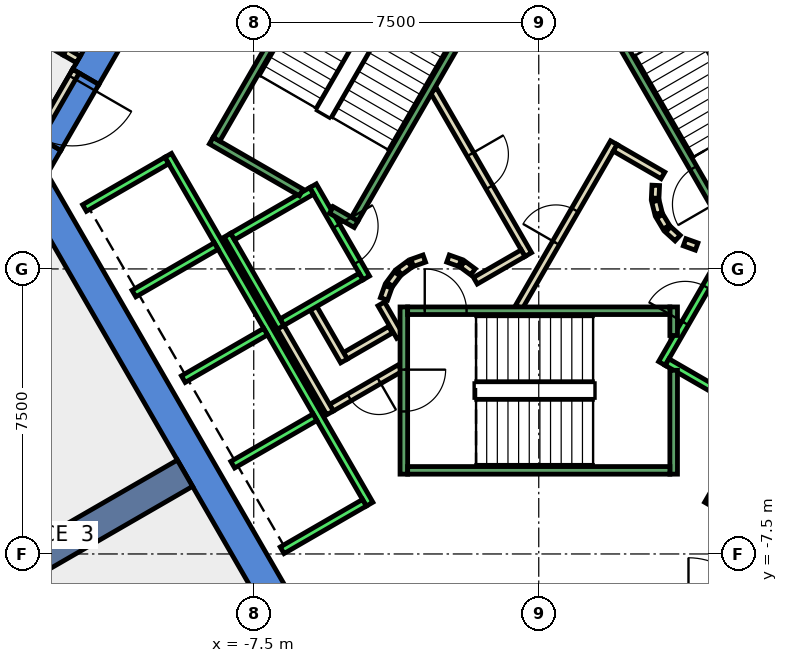
"""IFC4 building model, lengths in metres.
Left out: names, types, materials, properties, quantities, classifications, styles, units other than length and angle.
Written with IfcOpenShell. Run it as: python <this file> out.ifc"""

import sys

from ifc_helpers import new_model, si_unit, direction, frame, frame_2d, origin, place, context, subcontext, project, spatial, polyline, rectangle, outline, extrude, element, fill, save


model = new_model("IFC4")
c1 = context("Model", 3, precision=1e-05, world=origin(), true_north=direction((0.0, 1.0)))
c2 = subcontext(c1, "Body", "Model", "MODEL_VIEW")
j1 = project(units=[si_unit("LENGTHUNIT", "METRE"), si_unit("PLANEANGLEUNIT", "RADIAN")], contexts=[c1])
p1 = place(None, origin())
s1 = spatial("IfcSite", under=j1, at=p1, CompositionType="ELEMENT")
p2 = place(p1, origin())
s2 = spatial("IfcBuilding", under=s1, at=p2, CompositionType="ELEMENT")
p3 = place(p2, frame((0.0, 0.0, 150.8)))
s3 = spatial("IfcBuildingStorey", under=s2, at=p3, CompositionType="ELEMENT", Elevation=150.8)
p4 = place(p3, frame((0.0, 0.0, -0.4)))
e1 = element("IfcWall", 1, at=p4, inside=s3, PredefinedType="SHEAR", context=c2, shape_type="SweptSolid", body=[
    extrude(outline(polyline([(-12.267, 5.252), (-11.575, 4.852), (-6.466, 13.7), (-6.928, 14.5), (-12.267, 5.252)])), origin(), (0.0, 0.0, 1.0), 4.2),
])
p5 = place(p3, frame((0.0, 0.0, -0.4)))
e2 = element("IfcWall", 2, at=p5, inside=s3, PredefinedType="SHEAR", context=c2, shape_type="SweptSolid", body=[
    extrude(outline(polyline([(-12.575, 3.12), (-13.267, 3.52), (-13.856, 2.5), (-12.933, 2.5), (-12.575, 3.12)])), origin(), (0.0, 0.0, 1.0), 4.2),
])
p6 = place(p3, frame((0.0, 0.0, 3.6)))
e3 = element("IfcWall", 3, at=p6, inside=s3, PredefinedType="SHEAR", context=c2, shape_type="SweptSolid", body=[
    extrude(outline(polyline([(-13.267, 3.52), (-12.575, 3.12), (-11.575, 4.852), (-12.267, 5.252), (-13.267, 3.52)])), origin(), (0.0, 0.0, 1.0), 0.2),
])
p7 = place(p3, frame((0.0, 0.0, -0.4)))
e4 = element("IfcWall", 4, at=p7, inside=s3, PredefinedType="SHEAR", context=c2, shape_type="SweptSolid", body=[
    extrude(outline(polyline([(-13.856, 2.5), (-6.928, -9.5), (-6.466, -8.7), (-12.933, 2.5), (-13.856, 2.5)])), origin(), (0.0, 0.0, 1.0), 4.2),
])
p8 = place(p3, frame((-9.31, -5.375, -0.4), z_axis=(0.0, 0.0, 1.0), x_axis=(-0.866017533419, -0.500013631625, 0.0)))
e5 = element("IfcWall", 5, at=p8, inside=s3, PredefinedType="SHEAR", context=c2, shape_type="SweptSolid", body=[
    extrude(rectangle(XDim=9.0, YDim=0.8, at=frame_2d((4.5, 0.0))), origin(), (0.0, 0.0, 1.0), 4.2),
])
p9 = place(p3, frame((-14.359, 6.806, 0.0), z_axis=(0.0, 0.0, 1.0), x_axis=(0.866155875717, -0.499773947861, 0.0)))
e6 = element("IfcWall", 6, at=p9, inside=s3, PredefinedType="PARTITIONING", context=c2, shape_type="SweptSolid", body=[
    extrude(rectangle(XDim=2.189, YDim=0.2, at=frame_2d((1.094, 0.0))), origin(), (0.0, 0.0, 1.0), 3.8),
])
p10 = place(p3, frame((-3.9, -1.599, 0.0), z_axis=(0.0, 0.0, 1.0), x_axis=(-0.865969445389, -0.500096910261, 0.0)))
e7 = element("IfcWall", 7, at=p10, inside=s3, PredefinedType="PARTITIONING", context=c2, shape_type="SweptSolid", body=[
    extrude(rectangle(XDim=1.373, YDim=0.2, at=frame_2d((0.687, 0.0))), origin(), (0.0, 0.0, 1.0), 3.8),
])
p11 = place(p3, frame((-5.126, -2.422, 0.0), z_axis=(0.0, 0.0, 1.0), x_axis=(-0.500062241894, 0.865989465428, 0.0)))
e8 = element("IfcWall", 8, at=p11, inside=s3, PredefinedType="PARTITIONING", context=c2, shape_type="SweptSolid", body=[
    extrude(rectangle(XDim=1.7, YDim=0.2, at=frame_2d((0.85, 0.0))), origin(), (0.0, 0.0, 1.0), 3.8),
])
p12 = place(p3, frame((-3.65, -2.61, 0.0), z_axis=(0.0, 0.0, 1.0), x_axis=(-0.866072462134, -0.499918483688, 0.0)))
e9 = element("IfcWall", 9, at=p12, inside=s3, PredefinedType="PARTITIONING", context=c2, shape_type="SweptSolid", body=[
    extrude(rectangle(XDim=2.084, YDim=0.2, at=frame_2d((1.042, 0.0))), origin(), (0.0, 0.0, 1.0), 3.8),
])
p13 = place(p12, frame((0.642, 0.0, 0.0)))
e10 = element("IfcOpeningElement", 10, at=p13, cuts=e9, PredefinedType="OPENING", context=c2, shape_type="SweptSolid", body=[
    extrude(rectangle(XDim=0.9, YDim=2.1, at=frame_2d((0.45, 1.05))), frame((0.0, 0.11, 0.0), z_axis=(0.0, -1.0, 0.0), x_axis=(1.0, 0.0, 0.0)), (0.0, 0.0, 1.0), 0.22),
])
p14 = place(p3, frame((-5.492, -3.788, 0.0), z_axis=(0.0, 0.0, 1.0), x_axis=(-0.500008949224, 0.866020236886, 0.0)))
e11 = element("IfcWall", 11, at=p14, inside=s3, PredefinedType="PARTITIONING", context=c2, shape_type="SweptSolid", body=[
    extrude(rectangle(XDim=2.68, YDim=0.2, at=frame_2d((1.34, 0.0))), origin(), (0.0, 0.0, 1.0), 3.8),
])
p15 = place(p3, frame((-4.145, -0.92, 0.0), z_axis=(0.0, 0.0, 1.0), x_axis=(0.499743786207, -0.866173278362, 0.0)))
e12 = element("IfcWall", 12, at=p15, inside=s3, PredefinedType="PARTITIONING", context=c2, shape_type="SweptSolid", body=[
    extrude(rectangle(XDim=0.991, YDim=0.2, at=frame_2d((0.495, 0.0))), origin(), (0.0, 0.0, 1.0), 3.8),
])
p16 = place(p3, frame((-0.52, -1.0, 0.0), z_axis=(0.0, 0.0, 1.0), x_axis=(0.50011622646, 0.865958290007, 0.0)))
e13 = element("IfcWall", 13, at=p16, inside=s3, PredefinedType="PARTITIONING", context=c2, shape_type="SweptSolid", body=[
    extrude(rectangle(XDim=4.991, YDim=0.2, at=frame_2d((2.496, 0.0))), origin(), (0.0, 0.0, 1.0), 3.8),
])
p17 = place(p16, frame((1.945, 0.0, 0.0)))
e14 = element("IfcOpeningElement", 14, at=p17, cuts=e13, PredefinedType="OPENING", context=c2, shape_type="SweptSolid", body=[
    extrude(rectangle(XDim=1.0, YDim=2.1, at=frame_2d((0.5, 1.05))), frame((0.0, 0.11, 0.0), z_axis=(0.0, -1.0, 0.0), x_axis=(1.0, 0.0, 0.0)), (0.0, 0.0, 1.0), 0.22),
])
p18 = place(p3, frame((2.012, 3.186, 0.0), z_axis=(0.0, 0.0, 1.0), x_axis=(0.865891012941, -0.500232699559, 0.0)))
e15 = element("IfcWall", 15, at=p18, inside=s3, PredefinedType="PARTITIONING", context=c2, shape_type="SweptSolid", body=[
    extrude(rectangle(XDim=1.449, YDim=0.2, at=frame_2d((0.725, 0.0))), origin(), (0.0, 0.0, 1.0), 3.8),
])
p19 = place(p3, frame((3.079, 2.199, 0.0), z_axis=(0.0, 0.0, 1.0), x_axis=(-0.047771483479, -0.998858290933, 0.0)))
e16 = element("IfcWall", 16, at=p19, inside=s3, PredefinedType="PARTITIONING", context=c2, shape_type="SweptSolid", body=[
    extrude(rectangle(XDim=0.337, YDim=0.2, at=frame_2d((0.169, 0.0))), origin(), (0.0, 0.0, 1.0), 3.8),
])
p20 = place(p3, frame((3.07, 1.786, 0.0), z_axis=(0.0, 0.0, 1.0), x_axis=(0.242705583207, -0.970099994784, 0.0)))
e17 = element("IfcWall", 17, at=p20, inside=s3, PredefinedType="PARTITIONING", context=c2, shape_type="SweptSolid", body=[
    extrude(rectangle(XDim=0.338, YDim=0.2, at=frame_2d((0.169, 0.0))), origin(), (0.0, 0.0, 1.0), 3.8),
])
for number, where, z_axis, x_axis in (
    (18, (3.182, 1.388, 0.0), (0.0, 0.0, 1.0), (0.512, -0.859, 0.0)),
    (19, (3.404, 1.039, 0.0), (0.0, 0.0, 1.0), (0.74, -0.672, 0.0)),
):
    element("IfcWall", number, at=place(p3, frame(where, z_axis=z_axis, x_axis=x_axis)), inside=s3, PredefinedType="PARTITIONING", context=c2, shape_type="SweptSolid", body=[
        extrude(rectangle(XDim=0.338, YDim=0.2, at=frame_2d((0.169, 0.0))), origin(), (0.0, 0.0, 1.0), 3.8),
    ])
p21 = place(p3, frame((3.838, 0.702, 0.0), z_axis=(0.0, 0.0, 1.0), x_axis=(0.941035081519, -0.338308993895, 0.0)))
e20 = element("IfcWall", 20, at=p21, inside=s3, PredefinedType="PARTITIONING", context=c2, shape_type="SweptSolid", body=[
    extrude(rectangle(XDim=0.337, YDim=0.2, at=frame_2d((0.168, 0.0))), origin(), (0.0, 0.0, 1.0), 3.8),
])
p22 = place(p3, frame((-2.771, 4.7, 0.0), z_axis=(0.0, 0.0, 1.0), x_axis=(0.499969479948, -0.866043023828, 0.0)))
e21 = element("IfcWall", 21, at=p22, inside=s3, PredefinedType="PARTITIONING", context=c2, shape_type="SweptSolid", body=[
    extrude(rectangle(XDim=4.99, YDim=0.2, at=frame_2d((2.495, 0.0))), origin(), (0.0, 0.0, 1.0), 3.8),
])
p23 = place(p22, frame((1.945, 0.0, 0.0)))
e22 = element("IfcOpeningElement", 22, at=p23, cuts=e21, PredefinedType="OPENING", context=c2, shape_type="SweptSolid", body=[
    extrude(rectangle(XDim=1.0, YDim=2.1, at=frame_2d((0.5, 1.05))), frame((0.0, 0.11, 0.0), z_axis=(0.0, -1.0, 0.0), x_axis=(1.0, 0.0, 0.0)), (0.0, 0.0, 1.0), 0.22),
])
p24 = place(p3, frame((-0.412, 0.414, 0.0), z_axis=(0.0, 0.0, 1.0), x_axis=(-0.866017369001, -0.500013916395, 0.0)))
e23 = element("IfcWall", 23, at=p24, inside=s3, PredefinedType="PARTITIONING", context=c2, shape_type="SweptSolid", body=[
    extrude(rectangle(XDim=1.45, YDim=0.2, at=frame_2d((0.725, 0.0))), origin(), (0.0, 0.0, 1.0), 3.8),
])
p25 = place(p3, frame((-1.731, -0.077, 0.0), z_axis=(0.0, 0.0, 1.0), x_axis=(-0.804311165252, 0.594208338422, 0.0)))
e24 = element("IfcWall", 24, at=p25, inside=s3, PredefinedType="PARTITIONING", context=c2, shape_type="SweptSolid", body=[
    extrude(rectangle(XDim=0.338, YDim=0.2, at=frame_2d((0.169, 0.0))), origin(), (0.0, 0.0, 1.0), 3.8),
])
p26 = place(p3, frame((-2.07, 0.16, 0.0), z_axis=(0.0, 0.0, 1.0), x_axis=(-0.942199461132, 0.335052496547, 0.0)))
e25 = element("IfcWall", 25, at=p26, inside=s3, PredefinedType="PARTITIONING", context=c2, shape_type="SweptSolid", body=[
    extrude(rectangle(XDim=0.337, YDim=0.2, at=frame_2d((0.169, 0.0))), origin(), (0.0, 0.0, 1.0), 3.8),
])
p27 = place(p3, frame((-3.012, 0.273, 0.0), z_axis=(0.0, 0.0, 1.0), x_axis=(-0.942280615813, -0.334824194261, 0.0)))
e26 = element("IfcWall", 26, at=p27, inside=s3, PredefinedType="PARTITIONING", context=c2, shape_type="SweptSolid", body=[
    extrude(rectangle(XDim=0.338, YDim=0.2, at=frame_2d((0.169, 0.0))), origin(), (0.0, 0.0, 1.0), 3.8),
])
p28 = place(p3, frame((-3.397, 0.124, 0.0), z_axis=(0.0, 0.0, 1.0), x_axis=(-0.804311165252, -0.594208338422, 0.0)))
e27 = element("IfcWall", 27, at=p28, inside=s3, PredefinedType="PARTITIONING", context=c2, shape_type="SweptSolid", body=[
    extrude(rectangle(XDim=0.338, YDim=0.2, at=frame_2d((0.169, 0.0))), origin(), (0.0, 0.0, 1.0), 3.8),
])
p29 = place(p3, frame((-3.723, -0.131, 0.0), z_axis=(0.0, 0.0, 1.0), x_axis=(-0.594675113454, -0.803966112121, 0.0)))
e28 = element("IfcWall", 28, at=p29, inside=s3, PredefinedType="PARTITIONING", context=c2, shape_type="SweptSolid", body=[
    extrude(rectangle(XDim=0.338, YDim=0.2, at=frame_2d((0.169, 0.0))), origin(), (0.0, 0.0, 1.0), 3.8),
])
p30 = place(p3, frame((-3.96, -0.47, 0.0), z_axis=(0.0, 0.0, 1.0), x_axis=(-0.334824194261, -0.942280615813, 0.0)))
e29 = element("IfcWall", 29, at=p30, inside=s3, PredefinedType="PARTITIONING", context=c2, shape_type="SweptSolid", body=[
    extrude(rectangle(XDim=0.338, YDim=0.2, at=frame_2d((0.169, 0.0))), origin(), (0.0, 0.0, 1.0), 3.8),
])
p31 = place(p3, frame((-12.18, 5.202, 0.0), z_axis=(0.0, 0.0, 1.0), x_axis=(-0.50002537861, -0.866010750942, 0.0)))
e30 = element("IfcWall", 30, at=p31, inside=s3, PredefinedType="PARTITIONING", context=c2, shape_type="SweptSolid", body=[
    extrude(rectangle(XDim=2.0, YDim=0.2, at=frame_2d((1.0, 0.0))), origin(), (0.0, 0.0, 1.0), 2.4),
])
p32 = place(p31, frame((0.19, 0.0, 0.0)))
e31 = element("IfcOpeningElement", 31, at=p32, cuts=e30, PredefinedType="OPENING", context=c2, shape_type="SweptSolid", body=[
    extrude(rectangle(XDim=1.8, YDim=2.1, at=frame_2d((0.9, 1.05))), frame((0.0, 0.11, 0.0), z_axis=(0.0, -1.0, 0.0), x_axis=(1.0, 0.0, 0.0)), (0.0, 0.0, 1.0), 0.22),
])
p33 = place(p3, frame((-12.463, 5.712, 0.0), z_axis=(0.0, 0.0, 1.0), x_axis=(0.865788603161, -0.500409926597, 0.0)))
e32 = element("IfcWall", 32, at=p33, inside=s3, PredefinedType="PARTITIONING", context=c2, shape_type="SweptSolid", body=[
    extrude(rectangle(XDim=0.4, YDim=0.2, at=frame_2d((0.2, 0.0))), origin(), (0.0, 0.0, 1.0), 2.4),
])
p34 = place(p3, frame((-5.94, 2.188, 0.0), z_axis=(0.0, 0.0, 1.0), x_axis=(0.49994636267, -0.866056369097, 0.0)))
e33 = element("IfcWall", 33, at=p34, inside=s3, PredefinedType="STANDARD", context=c2, shape_type="SweptSolid", body=[
    extrude(rectangle(XDim=2.8, YDim=0.2, at=frame_2d((1.4, 0.0))), origin(), (0.0, 0.0, 1.0), 3.8),
])
p35 = place(p34, frame((1.225, 0.0, 0.0)))
e34 = element("IfcOpeningElement", 34, at=p35, cuts=e33, PredefinedType="OPENING", context=c2, shape_type="SweptSolid", body=[
    extrude(rectangle(XDim=1.1, YDim=2.1, at=frame_2d((0.55, 1.05))), frame((0.0, 0.11, 0.0), z_axis=(0.0, -1.0, 0.0), x_axis=(1.0, 0.0, 0.0)), (0.0, 0.0, 1.0), 0.22),
])
p36 = place(p3, frame((-8.192, 0.888, 0.0), z_axis=(0.0, 0.0, 1.0), x_axis=(0.49994636267, -0.866056369097, 0.0)))
e35 = element("IfcWall", 35, at=p36, inside=s3, PredefinedType="STANDARD", context=c2, shape_type="SweptSolid", body=[
    extrude(rectangle(XDim=2.8, YDim=0.2, at=frame_2d((1.4, 0.0))), origin(), (0.0, 0.0, 1.0), 3.8),
])
for number, where, z_axis, x_axis in (
    (36, (-5.977, 2.052, 0.0), (0.0, 0.0, 1.0), (-0.866, -0.5, 0.0)),
    (37, (-4.677, -0.2, 0.0), (0.0, 0.0, 1.0), (-0.866, -0.5, 0.0)),
):
    element("IfcWall", number, at=place(p3, frame(where, z_axis=z_axis, x_axis=x_axis)), inside=s3, PredefinedType="STANDARD", context=c2, shape_type="SweptSolid", body=[
        extrude(rectangle(XDim=2.399, YDim=0.2, at=frame_2d((1.2, 0.0))), origin(), (0.0, 0.0, 1.0), 3.8),
    ])
p37 = place(p3, frame((-9.751, 2.99, 0.0), z_axis=(0.0, 0.0, 1.0), x_axis=(0.50000090737, -0.866024879913, 0.0)))
e38 = element("IfcWall", 38, at=p37, inside=s3, PredefinedType="STANDARD", context=c2, shape_type="SweptSolid", body=[
    extrude(rectangle(XDim=10.6, YDim=0.2, at=frame_2d((5.3, 0.0))), origin(), (0.0, 0.0, 1.0), 3.8),
])
p38 = place(p3, frame((-9.788, 2.853, 0.0), z_axis=(0.0, 0.0, 1.0), x_axis=(-0.865998541277, -0.500046524342, 0.0)))
e39 = element("IfcWall", 39, at=p38, inside=s3, PredefinedType="STANDARD", context=c2, shape_type="SweptSolid", body=[
    extrude(rectangle(XDim=2.5, YDim=0.2, at=frame_2d((1.25, 0.0))), origin(), (0.0, 0.0, 1.0), 3.8),
])
for number, where, z_axis, x_axis in (
    (40, (-8.488, 0.602, 0.0), (0.0, 0.0, 1.0), (-0.866, -0.5, 0.0)),
    (41, (-7.188, -1.65, 0.0), (0.0, 0.0, 1.0), (-0.866, -0.5, 0.0)),
    (42, (-5.888, -3.902, 0.0), (0.0, 0.0, 1.0), (-0.866, -0.5, 0.0)),
    (43, (-4.588, -6.153, 0.0), (0.0, 0.0, 1.0), (-0.866, -0.5, 0.0)),
):
    element("IfcWall", number, at=place(p3, frame(where, z_axis=z_axis, x_axis=x_axis)), inside=s3, PredefinedType="STANDARD", context=c2, shape_type="SweptSolid", body=[
        extrude(rectangle(XDim=2.5, YDim=0.2, at=frame_2d((1.25, 0.0))), origin(), (0.0, 0.0, 1.0), 3.8),
    ])
p39 = place(p3, frame((3.24, -2.488, 0.0), z_axis=(0.0, 0.0, 1.0), x_axis=(0.49994636267, 0.866056369097, 0.0)))
e44 = element("IfcWall", 44, at=p39, inside=s3, PredefinedType="STANDARD", context=c2, shape_type="SweptSolid", body=[
    extrude(rectangle(XDim=2.8, YDim=0.2, at=frame_2d((1.4, 0.0))), origin(), (0.0, 0.0, 1.0), 3.8),
])
p40 = place(p39, frame((1.225, 0.0, 0.0)))
e45 = element("IfcOpeningElement", 45, at=p40, cuts=e44, PredefinedType="OPENING", context=c2, shape_type="SweptSolid", body=[
    extrude(rectangle(XDim=1.1, YDim=2.1, at=frame_2d((0.55, 1.05))), frame((0.0, 0.11, 0.0), z_axis=(0.0, -1.0, 0.0), x_axis=(1.0, 0.0, 0.0)), (0.0, 0.0, 1.0), 0.22),
])
p41 = place(p3, frame((3.377, -2.452, 0.0), z_axis=(0.0, 0.0, 1.0), x_axis=(0.865955154139, -0.50012165622, 0.0)))
e46 = element("IfcWall", 46, at=p41, inside=s3, PredefinedType="STANDARD", context=c2, shape_type="SweptSolid", body=[
    extrude(rectangle(XDim=2.4, YDim=0.2, at=frame_2d((1.2, 0.0))), origin(), (0.0, 0.0, 1.0), 3.8),
])
p42 = place(p3, frame((4.451, -6.19, 0.0), z_axis=(0.0, 0.0, 1.0), x_axis=(0.50000090737, 0.866024879913, 0.0)))
e47 = element("IfcWall", 47, at=p42, inside=s3, PredefinedType="STANDARD", context=c2, shape_type="SweptSolid", body=[
    extrude(rectangle(XDim=10.6, YDim=0.2, at=frame_2d((5.3, 0.0))), origin(), (0.0, 0.0, 1.0), 3.8),
])
p43 = place(p3, frame((-3.55, -1.0, 0.0), z_axis=(0.0, 0.0, 1.0), x_axis=(0.0, -1.0, 0.0)))
e48 = element("IfcWall", 48, at=p43, inside=s3, PredefinedType="STANDARD", context=c2, shape_type="SweptSolid", body=[
    extrude(rectangle(XDim=4.4, YDim=0.2, at=frame_2d((2.2, 0.0))), origin(), (0.0, 0.0, 1.0), 3.8),
])
p44 = place(p43, frame((1.65, 0.0, 0.0)))
e49 = element("IfcOpeningElement", 49, at=p44, cuts=e48, PredefinedType="OPENING", context=c2, shape_type="SweptSolid", body=[
    extrude(rectangle(XDim=1.1, YDim=2.2, at=frame_2d((0.55, 1.1))), frame((0.0, 0.11, 0.0), z_axis=(0.0, -1.0, 0.0), x_axis=(1.0, 0.0, 0.0)), (0.0, 0.0, 1.0), 0.22),
])
p45 = place(p3, frame((3.55, -2.667, 0.0), z_axis=(0.0, 0.0, 1.0), x_axis=(0.0, -1.0, 0.0)))
e50 = element("IfcWall", 50, at=p45, inside=s3, PredefinedType="STANDARD", context=c2, shape_type="SweptSolid", body=[
    extrude(rectangle(XDim=2.733, YDim=0.2, at=frame_2d((1.366, 0.0))), origin(), (0.0, 0.0, 1.0), 3.8),
])
p46 = place(p3, frame((3.55, -1.0, 0.0), z_axis=(0.0, 0.0, 1.0), x_axis=(0.0, -1.0, 0.0)))
e51 = element("IfcWall", 51, at=p46, inside=s3, PredefinedType="STANDARD", context=c2, shape_type="SweptSolid", body=[
    extrude(rectangle(XDim=0.751, YDim=0.2, at=frame_2d((0.375, 0.0))), origin(), (0.0, 0.0, 1.0), 3.8),
])
p47 = place(p3, frame((-3.45, -1.1, 0.0), z_axis=(0.0, 0.0, 1.0), x_axis=(1.0, 0.0, 0.0)))
e52 = element("IfcWall", 52, at=p47, inside=s3, PredefinedType="STANDARD", context=c2, shape_type="SweptSolid", body=[
    extrude(rectangle(XDim=6.9, YDim=0.2, at=frame_2d((3.45, 0.0))), origin(), (0.0, 0.0, 1.0), 3.8),
])
p48 = place(p47, frame((0.45, 0.0, 0.0)))
e53 = element("IfcOpeningElement", 53, at=p48, cuts=e52, PredefinedType="OPENING", context=c2, shape_type="SweptSolid", body=[
    extrude(rectangle(XDim=1.1, YDim=2.2, at=frame_2d((0.55, 1.1))), frame((0.0, 0.11, 0.0), z_axis=(0.0, -1.0, 0.0), x_axis=(1.0, 0.0, 0.0)), (0.0, 0.0, 1.0), 0.22),
])
p49 = place(p3, frame((-3.45, -5.3, 0.0), z_axis=(0.0, 0.0, 1.0), x_axis=(1.0, 0.0, 0.0)))
e54 = element("IfcWall", 54, at=p49, inside=s3, PredefinedType="STANDARD", context=c2, shape_type="SweptSolid", body=[
    extrude(rectangle(XDim=6.9, YDim=0.2, at=frame_2d((3.45, 0.0))), origin(), (0.0, 0.0, 1.0), 3.8),
])
p50 = place(p3, frame((4.843, 1.312, 0.0), z_axis=(0.0, 0.0, 1.0), x_axis=(-0.499963383562, 0.866046543262, 0.0)))
e55 = element("IfcWall", 55, at=p50, inside=s3, PredefinedType="STANDARD", context=c2, shape_type="SweptSolid", body=[
    extrude(rectangle(XDim=6.9, YDim=0.2, at=frame_2d((3.45, 0.0))), origin(), (0.0, 0.0, 1.0), 3.8),
])
p51 = place(p50, frame((0.45, 0.0, 0.0)))
e56 = element("IfcOpeningElement", 56, at=p51, cuts=e55, PredefinedType="OPENING", context=c2, shape_type="SweptSolid", body=[
    extrude(rectangle(XDim=1.1, YDim=2.2, at=frame_2d((0.55, 1.1))), frame((0.0, 0.11, 0.0), z_axis=(0.0, -1.0, 0.0), x_axis=(1.0, 0.0, 0.0)), (0.0, 0.0, 1.0), 0.22),
])
p52 = place(p3, frame((-6.25, 2.01, 0.0), z_axis=(0.0, 0.0, 1.0), x_axis=(-0.86611865017, 0.499838457731, 0.0)))
e57 = element("IfcWall", 57, at=p52, inside=s3, PredefinedType="STANDARD", context=c2, shape_type="SweptSolid", body=[
    extrude(rectangle(XDim=2.733, YDim=0.2, at=frame_2d((1.366, 0.0))), origin(), (0.0, 0.0, 1.0), 3.8),
])
p53 = place(p3, frame((-4.806, 1.176, 0.0), z_axis=(0.0, 0.0, 1.0), x_axis=(-0.866558586415, 0.499075361355, 0.0)))
e58 = element("IfcWall", 58, at=p53, inside=s3, PredefinedType="STANDARD", context=c2, shape_type="SweptSolid", body=[
    extrude(rectangle(XDim=0.751, YDim=0.2, at=frame_2d((0.376, 0.0))), origin(), (0.0, 0.0, 1.0), 3.8),
])
p54 = place(p3, frame((-1.393, 7.288, 0.0), z_axis=(0.0, 0.0, 1.0), x_axis=(-0.499963383562, -0.866046543262, 0.0)))
e59 = element("IfcWall", 59, at=p54, inside=s3, PredefinedType="STANDARD", context=c2, shape_type="SweptSolid", body=[
    extrude(rectangle(XDim=6.9, YDim=0.2, at=frame_2d((3.45, 0.0))), origin(), (0.0, 0.0, 1.0), 3.8),
])
p55 = place(p54, frame((0.45, 0.0, 0.0)))
e60 = element("IfcOpeningElement", 60, at=p55, cuts=e59, PredefinedType="OPENING", context=c2, shape_type="SweptSolid", body=[
    extrude(rectangle(XDim=1.1, YDim=2.2, at=frame_2d((0.55, 1.1))), frame((0.0, 0.11, 0.0), z_axis=(0.0, -1.0, 0.0), x_axis=(1.0, 0.0, 0.0)), (0.0, 0.0, 1.0), 0.22),
])
p56 = place(p3, frame((-5.03, 9.388, 0.0), z_axis=(0.0, 0.0, 1.0), x_axis=(-0.499978703459, -0.866037698999, 0.0)))
e61 = element("IfcWall", 61, at=p56, inside=s3, PredefinedType="STANDARD", context=c2, shape_type="SweptSolid", body=[
    extrude(rectangle(XDim=6.9, YDim=0.2, at=frame_2d((3.45, 0.0))), origin(), (0.0, 0.0, 1.0), 3.8),
])
p57 = place(p17, origin())
e62 = element("IfcDoor", 62, at=p57, inside=s3, OperationType="SINGLE_SWING_LEFT", PredefinedType="DOOR", context=c2, shape_type="SweptSolid", body=[
    extrude(rectangle(XDim=1.0, YDim=2.1, at=frame_2d((0.5, 1.05))), frame((0.0, 0.025, 0.0), z_axis=(0.0, -1.0, 0.0), x_axis=(1.0, 0.0, 0.0)), (0.0, 0.0, 1.0), 0.05),
])
fill(e14, e62)
p58 = place(p23, origin())
e63 = element("IfcDoor", 63, at=p58, inside=s3, OperationType="SINGLE_SWING_RIGHT", PredefinedType="DOOR", context=c2, shape_type="SweptSolid", body=[
    extrude(rectangle(XDim=1.0, YDim=2.1, at=frame_2d((0.5, 1.05))), frame((0.0, 0.025, 0.0), z_axis=(0.0, -1.0, 0.0), x_axis=(1.0, 0.0, 0.0)), (0.0, 0.0, 1.0), 0.05),
])
fill(e22, e63)
p59 = place(p13, origin())
e64 = element("IfcDoor", 64, at=p59, inside=s3, OperationType="SINGLE_SWING_LEFT", PredefinedType="DOOR", context=c2, shape_type="SweptSolid", body=[
    extrude(rectangle(XDim=0.9, YDim=2.1, at=frame_2d((0.45, 1.05))), frame((0.0, 0.025, 0.0), z_axis=(0.0, -1.0, 0.0), x_axis=(1.0, 0.0, 0.0)), (0.0, 0.0, 1.0), 0.05),
])
fill(e10, e64)
p60 = place(p32, origin())
e65 = element("IfcDoor", 65, at=p60, inside=s3, OperationType="DOUBLE_DOOR_SINGLE_SWING", PredefinedType="DOOR", context=c2, shape_type="SweptSolid", body=[
    extrude(rectangle(XDim=1.8, YDim=2.1, at=frame_2d((0.9, 1.05))), frame((0.0, 0.025, 0.0), z_axis=(0.0, -1.0, 0.0), x_axis=(1.0, 0.0, 0.0)), (0.0, 0.0, 1.0), 0.05),
])
fill(e31, e65)
p61 = place(p40, origin())
e66 = element("IfcDoor", 66, at=p61, inside=s3, OperationType="SLIDING_TO_LEFT", PredefinedType="DOOR", context=c2, shape_type="SweptSolid", body=[
    extrude(rectangle(XDim=1.1, YDim=2.1, at=frame_2d((0.55, 1.05))), frame((0.0, 0.025, 0.0), z_axis=(0.0, -1.0, 0.0), x_axis=(1.0, 0.0, 0.0)), (0.0, 0.0, 1.0), 0.05),
])
fill(e45, e66)
p62 = place(p35, origin())
e67 = element("IfcDoor", 67, at=p62, inside=s3, OperationType="SLIDING_TO_LEFT", PredefinedType="DOOR", context=c2, shape_type="SweptSolid", body=[
    extrude(rectangle(XDim=1.1, YDim=2.1, at=frame_2d((0.55, 1.05))), frame((0.0, 0.025, 0.0), z_axis=(0.0, -1.0, 0.0), x_axis=(1.0, 0.0, 0.0)), (0.0, 0.0, 1.0), 0.05),
])
fill(e34, e67)
p63 = place(p48, origin())
e68 = element("IfcDoor", 68, at=p63, inside=s3, OperationType="SINGLE_SWING_LEFT", PredefinedType="DOOR", context=c2, shape_type="SweptSolid", body=[
    extrude(rectangle(XDim=1.1, YDim=2.2, at=frame_2d((0.55, 1.1))), frame((0.0, 0.025, 0.0), z_axis=(0.0, -1.0, 0.0), x_axis=(1.0, 0.0, 0.0)), (0.0, 0.0, 1.0), 0.05),
])
fill(e53, e68)
p64 = place(p44, origin())
e69 = element("IfcDoor", 69, at=p64, inside=s3, OperationType="SINGLE_SWING_LEFT", PredefinedType="DOOR", context=c2, shape_type="SweptSolid", body=[
    extrude(rectangle(XDim=1.1, YDim=2.2, at=frame_2d((0.55, 1.1))), frame((0.0, 0.025, 0.0), z_axis=(0.0, -1.0, 0.0), x_axis=(1.0, 0.0, 0.0)), (0.0, 0.0, 1.0), 0.05),
])
fill(e49, e69)
p65 = place(p51, origin())
e70 = element("IfcDoor", 70, at=p65, inside=s3, OperationType="SINGLE_SWING_LEFT", PredefinedType="DOOR", context=c2, shape_type="SweptSolid", body=[
    extrude(rectangle(XDim=1.1, YDim=2.2, at=frame_2d((0.55, 1.1))), frame((0.0, 0.025, 0.0), z_axis=(0.0, -1.0, 0.0), x_axis=(1.0, 0.0, 0.0)), (0.0, 0.0, 1.0), 0.05),
])
fill(e56, e70)
save(model, sys.argv[1])
